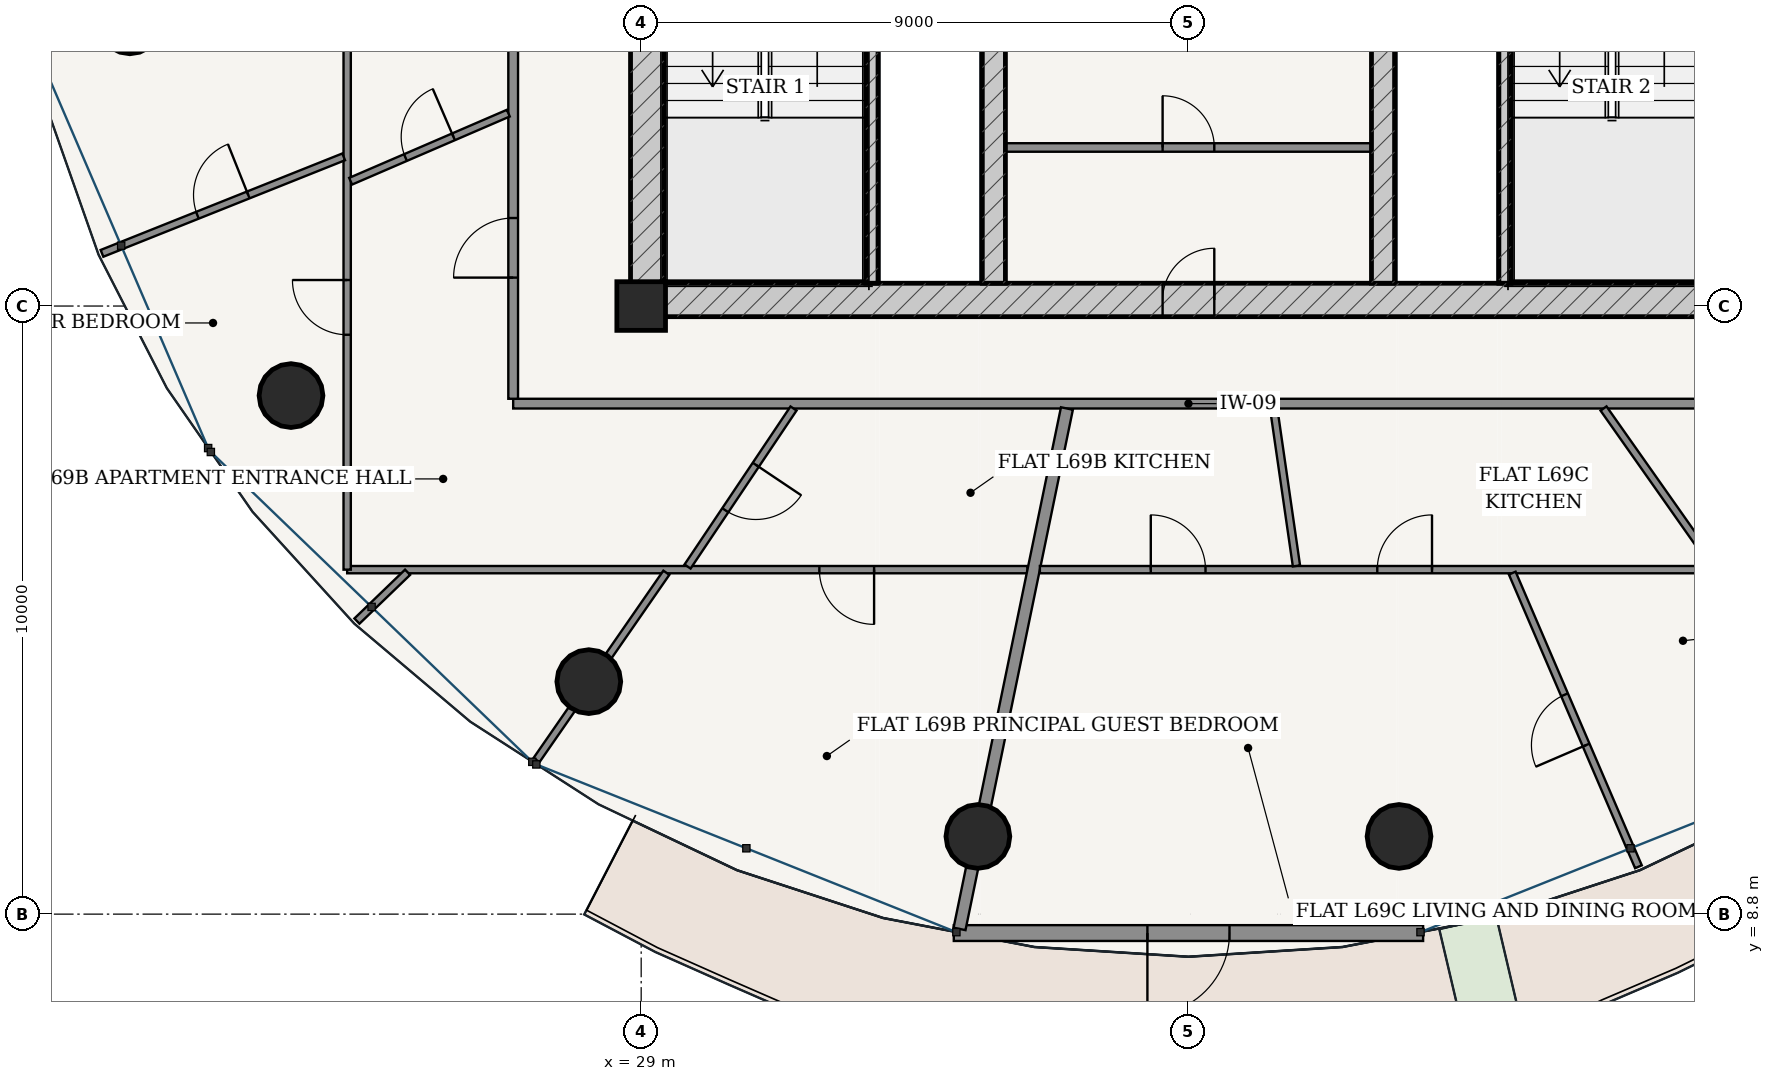
"""IFC4 building model, lengths in metres.
Left out: names, types, materials, properties, quantities, classifications, styles, units other than length and angle.
Written with IfcOpenShell. Run it as: python <this file> out.ifc"""

import sys

from ifc_helpers import new_model, si_unit, direction, frame, frame_2d, origin, origin_2d, place, context, subcontext, project, spatial, rectangle, hollow_circle, extrude, source, transform, mapped, element, fill, save


model = new_model("IFC4")
c1 = context("Model", 3, precision=1e-05, world=origin(), true_north=direction((-0.2419218956, 0.970295726276)))
c2 = subcontext(c1, "Body", "Model", "MODEL_VIEW")
j1 = project(units=[si_unit("LENGTHUNIT", "METRE"), si_unit("PLANEANGLEUNIT", "RADIAN")], contexts=[c1])
p1 = place(None, origin())
s1 = spatial("IfcSite", under=j1, at=p1, CompositionType="ELEMENT")
p2 = place(p1, origin())
s2 = spatial("IfcBuilding", under=s1, at=p2, CompositionType="ELEMENT")
p3 = place(p2, frame((0.0, 0.0, 263.2)))
s3 = spatial("IfcBuildingStorey", under=s2, at=p3, CompositionType="ELEMENT", Elevation=263.2)
p4 = place(p3, frame((29.0, 18.8, 0.0), z_axis=(0.0, 0.0, 1.0), x_axis=(1.0, 0.0, 0.0)))
e1 = element("IfcColumn", 1, at=p4, inside=s3, PredefinedType="COLUMN", context=c2, shape_type="SweptSolid", body=[
    extrude(rectangle(XDim=0.8, YDim=0.8, at=origin_2d()), origin(), (0.0, 0.0, 1.0), 3.75),
])
p5 = place(p3, frame((28.825, 18.9, 0.0), z_axis=(0.0, 0.0, 1.0), x_axis=(1.0, 0.0, 0.0)))
e2 = element("IfcWall", 2, at=p5, inside=s3, PredefinedType="SHEAR", context=c2, shape_type="SweptSolid", body=[
    extrude(rectangle(XDim=18.35, YDim=0.55, at=frame_2d((9.175, 0.0))), origin(), (0.0, 0.0, 1.0), 3.49),
])
p6 = place(p5, frame((8.75, 0.0, 0.0)))
e3 = element("IfcOpeningElement", 3, at=p6, cuts=e2, PredefinedType="OPENING", context=c2, shape_type="SweptSolid", body=[
    extrude(rectangle(XDim=0.85, YDim=2.1, at=frame_2d((0.425, 1.05))), frame((0.0, 0.285, 0.0), z_axis=(0.0, -1.0, 0.0), x_axis=(1.0, 0.0, 0.0)), (0.0, 0.0, 1.0), 0.57),
])
p7 = place(p3, frame((29.1, 19.175, 0.0), z_axis=(0.0, 0.0, 1.0), x_axis=(0.0, 1.0, 0.0)))
e4 = element("IfcWall", 4, at=p7, inside=s3, PredefinedType="SHEAR", context=c2, shape_type="SweptSolid", body=[
    extrude(rectangle(XDim=15.25, YDim=0.55, at=frame_2d((7.625, 0.0))), origin(), (0.0, 0.0, 1.0), 3.49),
])
p8 = place(p7, frame((9.875, 0.0, 0.0)))
e5 = element("IfcOpeningElement", 5, at=p8, cuts=e4, PredefinedType="OPENING", context=c2, shape_type="SweptSolid", body=[
    extrude(rectangle(XDim=1.5, YDim=2.2, at=frame_2d((0.75, 1.1))), frame((0.0, 0.285, 0.0), z_axis=(0.0, -1.0, 0.0), x_axis=(1.0, 0.0, 0.0)), (0.0, 0.0, 1.0), 0.57),
])
for number, where, z_axis, x_axis in (
    (6, (32.795, 19.175, 0.0), (0.0, 0.0, 1.0), (0.0, 1.0, 0.0)),
    (7, (43.205, 19.175, 0.0), (0.0, 0.0, 1.0), (0.0, 1.0, 0.0)),
):
    element("IfcWall", number, at=place(p3, frame(where, z_axis=z_axis, x_axis=x_axis)), inside=s3, PredefinedType="SOLIDWALL", context=c2, shape_type="SweptSolid", body=[
        extrude(rectangle(XDim=7.375, YDim=0.2, at=frame_2d((3.688, 0.0))), origin(), (0.0, 0.0, 1.0), 3.49),
    ])
p9 = place(p3, frame((34.8, 19.175, 0.0), z_axis=(0.0, 0.0, 1.0), x_axis=(0.0, 1.0, 0.0)))
e8 = element("IfcWall", 8, at=p9, inside=s3, PredefinedType="SHEAR", context=c2, shape_type="SweptSolid", body=[
    extrude(rectangle(XDim=15.25, YDim=0.38, at=frame_2d((7.625, 0.0))), origin(), (0.0, 0.0, 1.0), 3.49),
])
p10 = place(p9, frame((7.8, 0.0, 0.0)))
e9 = element("IfcOpeningElement", 9, at=p10, cuts=e8, PredefinedType="OPENING", context=c2, shape_type="SweptSolid", body=[
    extrude(rectangle(XDim=1.05, YDim=2.15, at=frame_2d((0.525, 1.075))), frame((0.0, 0.2, 0.0), z_axis=(0.0, -1.0, 0.0), x_axis=(1.0, 0.0, 0.0)), (0.0, 0.0, 1.0), 0.4),
])
p11 = place(p3, frame((41.2, 19.175, 0.0), z_axis=(0.0, 0.0, 1.0), x_axis=(0.0, 1.0, 0.0)))
e10 = element("IfcWall", 10, at=p11, inside=s3, PredefinedType="SHEAR", context=c2, shape_type="SweptSolid", body=[
    extrude(rectangle(XDim=15.25, YDim=0.38, at=frame_2d((7.625, 0.0))), origin(), (0.0, 0.0, 1.0), 3.49),
])
p12 = place(p11, frame((7.8, 0.0, 0.0)))
e11 = element("IfcOpeningElement", 11, at=p12, cuts=e10, PredefinedType="OPENING", context=c2, shape_type="SweptSolid", body=[
    extrude(rectangle(XDim=1.05, YDim=2.15, at=frame_2d((0.525, 1.075))), frame((0.0, 0.2, 0.0), z_axis=(0.0, -1.0, 0.0), x_axis=(1.0, 0.0, 0.0)), (0.0, 0.0, 1.0), 0.4),
])
for number, where, z_axis, x_axis in (
    (12, (20.591, 23.474, 0.0), (0.0, 0.0, 1.0), (1.0, 0.0, 0.0)),
    (13, (23.241, 17.328, 0.0), (0.0, 0.0, 1.0), (1.0, 0.0, 0.0)),
    (14, (28.139, 12.624, 0.0), (0.0, 0.0, 1.0), (1.0, 0.0, 0.0)),
    (15, (34.537, 10.078, 0.0), (0.0, 0.0, 1.0), (1.0, 0.0, 0.0)),
    (16, (41.463, 10.078, 0.0), (0.0, 0.0, 1.0), (1.0, 0.0, 0.0)),
):
    element("IfcColumn", number, at=place(p3, frame(where, z_axis=z_axis, x_axis=x_axis)), inside=s3, PredefinedType="COLUMN", context=c2, shape_type="SweptSolid", body=[
        extrude(hollow_circle(Radius=0.525, WallThickness=0.035, at=origin_2d()), origin(), (0.0, 0.0, 1.0), 3.75),
    ])
p13 = place(p3, frame((34.141, 8.489, 0.0), z_axis=(0.0, 0.0, 1.0), x_axis=(1.0, 0.0, 0.0)))
e17 = element("IfcWall", 17, at=p13, inside=s3, PredefinedType="SOLIDWALL", context=c2, shape_type="SweptSolid", body=[
    extrude(rectangle(XDim=7.718, YDim=0.26, at=frame_2d((3.859, 0.0))), origin(), (0.0, 0.0, 1.0), 3.49),
])
p14 = place(p13, frame((3.184, 0.0, 0.0)))
e18 = element("IfcOpeningElement", 18, at=p14, cuts=e17, PredefinedType="OPENING", context=c2, shape_type="SweptSolid", body=[
    extrude(rectangle(XDim=1.35, YDim=2.2, at=frame_2d((0.675, 1.1))), frame((0.0, 0.14, 0.0), z_axis=(0.0, -1.0, 0.0), x_axis=(1.0, 0.0, 0.0)), (0.0, 0.0, 1.0), 0.28),
])
p15 = place(p3, frame((34.99, 21.407, 0.0), z_axis=(0.0, 0.0, 1.0), x_axis=(1.0, 0.0, 0.0)))
e19 = element("IfcWall", 19, at=p15, inside=s3, PredefinedType="PARTITIONING", context=c2, shape_type="SweptSolid", body=[
    extrude(rectangle(XDim=6.02, YDim=0.14, at=frame_2d((3.01, 0.0))), origin(), (0.0, 0.0, 1.0), 3.49),
])
p16 = place(p15, frame((2.585, 0.0, 0.0)))
e20 = element("IfcOpeningElement", 20, at=p16, cuts=e19, PredefinedType="OPENING", context=c2, shape_type="SweptSolid", body=[
    extrude(rectangle(XDim=0.85, YDim=2.1, at=frame_2d((0.425, 1.05))), frame((0.0, 0.08, 0.0), z_axis=(0.0, -1.0, 0.0), x_axis=(1.0, 0.0, 0.0)), (0.0, 0.0, 1.0), 0.16),
])
p17 = place(p3, frame((26.895, 17.195, 0.0), z_axis=(0.0, 0.0, 1.0), x_axis=(1.0, 0.0, 0.0)))
e21 = element("IfcWall", 21, at=p17, inside=s3, PredefinedType="PARTITIONING", context=c2, shape_type="SweptSolid", body=[
    extrude(rectangle(XDim=22.21, YDim=0.16, at=frame_2d((11.105, 0.0))), origin(), (0.0, 0.0, 1.0), 3.015),
])
p18 = place(p3, frame((26.895, 17.275, 0.0), z_axis=(0.0, 0.0, 1.0), x_axis=(0.0, 1.0, 0.0)))
e22 = element("IfcWall", 22, at=p18, inside=s3, PredefinedType="PARTITIONING", context=c2, shape_type="SweptSolid", body=[
    extrude(rectangle(XDim=13.925, YDim=0.16, at=frame_2d((6.962, 0.0))), origin(), (0.0, 0.0, 1.0), 3.015),
])
p19 = place(p18, frame((1.992, 0.0, 0.0)))
e23 = element("IfcOpeningElement", 23, at=p19, cuts=e22, PredefinedType="OPENING", context=c2, shape_type="SweptSolid", body=[
    extrude(rectangle(XDim=0.98, YDim=2.2, at=frame_2d((0.49, 1.1))), frame((0.0, 0.09, 0.0), z_axis=(0.0, -1.0, 0.0), x_axis=(1.0, 0.0, 0.0)), (0.0, 0.0, 1.0), 0.18),
])
p20 = place(p3, frame((35.353, 14.465, 0.0), z_axis=(0.0, 0.0, 1.0), x_axis=(-1.0, 0.0, 0.0)))
e24 = element("IfcWall", 24, at=p20, inside=s3, PredefinedType="PARTITIONING", context=c2, shape_type="SweptSolid", body=[
    extrude(rectangle(XDim=11.188, YDim=0.12, at=frame_2d((5.594, 0.0))), origin(), (0.0, 0.0, 1.0), 3.015),
])
p21 = place(p20, frame((2.522, 0.0, 0.0)))
e25 = element("IfcOpeningElement", 25, at=p21, cuts=e24, PredefinedType="OPENING", context=c2, shape_type="SweptSolid", body=[
    extrude(rectangle(XDim=0.9, YDim=2.15, at=frame_2d((0.45, 1.075))), frame((0.0, 0.07, 0.0), z_axis=(0.0, -1.0, 0.0), x_axis=(1.0, 0.0, 0.0)), (0.0, 0.0, 1.0), 0.14),
])
p22 = place(p3, frame((24.165, 14.465, 0.0), z_axis=(0.0, 0.0, 1.0), x_axis=(0.0, 1.0, 0.0)))
e26 = element("IfcWall", 26, at=p22, inside=s3, PredefinedType="PARTITIONING", context=c2, shape_type="SweptSolid", body=[
    extrude(rectangle(XDim=12.233, YDim=0.12, at=frame_2d((6.116, 0.0))), origin(), (0.0, 0.0, 1.0), 3.015),
])
p23 = place(p22, frame((3.863, 0.0, 0.0)))
e27 = element("IfcOpeningElement", 27, at=p23, cuts=e26, PredefinedType="OPENING", context=c2, shape_type="SweptSolid", body=[
    extrude(rectangle(XDim=0.9, YDim=2.15, at=frame_2d((0.45, 1.075))), frame((0.0, 0.07, 0.0), z_axis=(0.0, -1.0, 0.0), x_axis=(1.0, 0.0, 0.0)), (0.0, 0.0, 1.0), 0.14),
])
p24 = place(p3, frame((24.107, 21.253, 0.0), z_axis=(0.0, 0.0, 1.0), x_axis=(-0.928712556691, -0.370800467966, 0.0)))
e28 = element("IfcWall", 28, at=p24, inside=s3, PredefinedType="PARTITIONING", context=c2, shape_type="SweptSolid", body=[
    extrude(rectangle(XDim=4.28, YDim=0.12, at=frame_2d((2.14, 0.0))), origin(), (0.0, 0.0, 1.0), 3.121),
])
p25 = place(p24, frame((1.69, 0.0, 0.0)))
e29 = element("IfcOpeningElement", 29, at=p25, cuts=e28, PredefinedType="OPENING", context=c2, shape_type="SweptSolid", body=[
    extrude(rectangle(XDim=0.9, YDim=2.15, at=frame_2d((0.45, 1.075))), frame((0.0, 0.07, 0.0), z_axis=(0.0, -1.0, 0.0), x_axis=(1.0, 0.0, 0.0)), (0.0, 0.0, 1.0), 0.14),
])
p26 = place(p3, frame((25.159, 14.422, 0.0), z_axis=(0.0, 0.0, 1.0), x_axis=(-0.720070222664, -0.693901199331, 0.0)))
e30 = element("IfcWall", 30, at=p26, inside=s3, PredefinedType="PARTITIONING", context=c2, shape_type="SweptSolid", body=[
    extrude(rectangle(XDim=1.157, YDim=0.12, at=frame_2d((0.578, 0.0))), origin(), (0.0, 0.0, 1.0), 3.49),
])
p27 = place(p3, frame((29.414, 14.414, 0.0), z_axis=(0.0, 0.0, 1.0), x_axis=(-0.569657021681, -0.821882520589, 0.0)))
e31 = element("IfcWall", 31, at=p27, inside=s3, PredefinedType="PARTITIONING", context=c2, shape_type="SweptSolid", body=[
    extrude(rectangle(XDim=3.748, YDim=0.12, at=frame_2d((1.874, 0.0))), origin(), (0.0, 0.0, 1.0), 3.015),
])
p28 = place(p3, frame((26.815, 21.972, 0.0), z_axis=(0.0, 0.0, 1.0), x_axis=(-0.918135987469, -0.396265452082, 0.0)))
e32 = element("IfcWall", 32, at=p28, inside=s3, PredefinedType="PARTITIONING", context=c2, shape_type="SweptSolid", body=[
    extrude(rectangle(XDim=2.824, YDim=0.12, at=frame_2d((1.412, 0.0))), origin(), (0.0, 0.0, 1.0), 3.209),
])
p29 = place(p28, frame((0.982, 0.0, 0.0)))
e33 = element("IfcOpeningElement", 33, at=p29, cuts=e32, PredefinedType="OPENING", context=c2, shape_type="SweptSolid", body=[
    extrude(rectangle(XDim=0.86, YDim=2.15, at=frame_2d((0.43, 1.075))), frame((0.0, 0.07, 0.0), z_axis=(0.0, -1.0, 0.0), x_axis=(1.0, 0.0, 0.0)), (0.0, 0.0, 1.0), 0.14),
])
p30 = place(p3, frame((31.505, 17.115, 0.0), z_axis=(0.0, 0.0, 1.0), x_axis=(-0.557003057019, -0.83051044212, 0.0)))
e34 = element("IfcWall", 34, at=p30, inside=s3, PredefinedType="PARTITIONING", context=c2, shape_type="SweptSolid", body=[
    extrude(rectangle(XDim=3.129, YDim=0.12, at=frame_2d((1.564, 0.0))), origin(), (0.0, 0.0, 1.0), 3.209),
])
p31 = place(p30, frame((1.114, 0.0, 0.0)))
e35 = element("IfcOpeningElement", 35, at=p31, cuts=e34, PredefinedType="OPENING", context=c2, shape_type="SweptSolid", body=[
    extrude(rectangle(XDim=0.9, YDim=2.15, at=frame_2d((0.45, 1.075))), frame((0.0, 0.07, 0.0), z_axis=(0.0, -1.0, 0.0), x_axis=(1.0, 0.0, 0.0)), (0.0, 0.0, 1.0), 0.14),
])
p32 = place(p3, frame((36.001, 17.115, 0.0), z_axis=(0.0, 0.0, 1.0), x_axis=(-0.202108543081, -0.979363128167, 0.0)))
e36 = element("IfcWall", 36, at=p32, inside=s3, PredefinedType="PARTITIONING", context=c2, shape_type="SweptSolid", body=[
    extrude(rectangle(XDim=8.739, YDim=0.2, at=frame_2d((4.369, 0.0))), origin(), (0.0, 0.0, 1.0), 3.015),
])
p33 = place(p3, frame((51.835, 14.465, 0.0), z_axis=(0.0, 0.0, 1.0), x_axis=(-1.0, 0.0, 0.0)))
e37 = element("IfcWall", 37, at=p33, inside=s3, PredefinedType="PARTITIONING", context=c2, shape_type="SweptSolid", body=[
    extrude(rectangle(XDim=16.278, YDim=0.12, at=frame_2d((8.139, 0.0))), origin(), (0.0, 0.0, 1.0), 3.015),
])
p34 = place(p33, frame((9.83, 0.0, 0.0)))
e38 = element("IfcOpeningElement", 38, at=p34, cuts=e37, PredefinedType="OPENING", context=c2, shape_type="SweptSolid", body=[
    extrude(rectangle(XDim=0.9, YDim=2.15, at=frame_2d((0.45, 1.075))), frame((0.0, 0.07, 0.0), z_axis=(0.0, -1.0, 0.0), x_axis=(1.0, 0.0, 0.0)), (0.0, 0.0, 1.0), 0.14),
])
p35 = place(p33, frame((13.554, 0.0, 0.0)))
e39 = element("IfcOpeningElement", 39, at=p35, cuts=e37, PredefinedType="OPENING", context=c2, shape_type="SweptSolid", body=[
    extrude(rectangle(XDim=0.9, YDim=2.15, at=frame_2d((0.45, 1.075))), frame((0.0, 0.07, 0.0), z_axis=(0.0, -1.0, 0.0), x_axis=(1.0, 0.0, 0.0)), (0.0, 0.0, 1.0), 0.14),
])
p36 = place(p3, frame((43.325, 14.408, 0.0), z_axis=(0.0, 0.0, 1.0), x_axis=(0.394816056217, -0.918760187292, 0.0)))
e40 = element("IfcWall", 40, at=p36, inside=s3, PredefinedType="PARTITIONING", context=c2, shape_type="SweptSolid", body=[
    extrude(rectangle(XDim=5.256, YDim=0.12, at=frame_2d((2.628, 0.0))), origin(), (0.0, 0.0, 1.0), 3.121),
])
p37 = place(p36, frame((2.178, 0.0, 0.0)))
e41 = element("IfcOpeningElement", 41, at=p37, cuts=e40, PredefinedType="OPENING", context=c2, shape_type="SweptSolid", body=[
    extrude(rectangle(XDim=0.9, YDim=2.15, at=frame_2d((0.45, 1.075))), frame((0.0, 0.07, 0.0), z_axis=(0.0, -1.0, 0.0), x_axis=(1.0, 0.0, 0.0)), (0.0, 0.0, 1.0), 0.14),
])
p38 = place(p3, frame((39.402, 17.115, 0.0), z_axis=(0.0, 0.0, 1.0), x_axis=(0.143185278857, -0.989695900728, 0.0)))
e42 = element("IfcWall", 42, at=p38, inside=s3, PredefinedType="PARTITIONING", context=c2, shape_type="SweptSolid", body=[
    extrude(rectangle(XDim=2.615, YDim=0.12, at=frame_2d((1.308, 0.0))), origin(), (0.0, 0.0, 1.0), 3.49),
])
p39 = place(p3, frame((44.826, 17.115, 0.0), z_axis=(0.0, 0.0, 1.0), x_axis=(0.57609227969, -0.817384661761, 0.0)))
e43 = element("IfcWall", 43, at=p39, inside=s3, PredefinedType="PARTITIONING", context=c2, shape_type="SweptSolid", body=[
    extrude(rectangle(XDim=3.18, YDim=0.12, at=frame_2d((1.59, 0.0))), origin(), (0.0, 0.0, 1.0), 3.209),
])
m1 = source(origin(), c2, "Body", "SweptSolid", [
    extrude(rectangle(XDim=1.35, YDim=2.2, at=frame_2d((0.675, 1.1))), frame((0.0, 0.025, 0.0), z_axis=(0.0, -1.0, 0.0), x_axis=(1.0, 0.0, 0.0)), (0.0, 0.0, 1.0), 0.05),
])
p40 = place(p14, frame((1.35, 0.0, 0.0), z_axis=(0.0, 0.0, 1.0), x_axis=(-1.0, 0.0, 0.0)))
e44 = element("IfcDoor", 44, at=p40, inside=s3, OperationType="SINGLE_SWING_RIGHT", PredefinedType="DOOR", context=c2, shape_type="MappedRepresentation", body=[
    mapped(m1, transform((0.0, 0.0, 0.0), scale=1.0)),
])
fill(e18, e44)
m2 = source(origin(), c2, "Body", "SweptSolid", [
    extrude(rectangle(XDim=0.85, YDim=2.1, at=frame_2d((0.425, 1.05))), frame((0.0, 0.025, 0.0), z_axis=(0.0, -1.0, 0.0), x_axis=(1.0, 0.0, 0.0)), (0.0, 0.0, 1.0), 0.05),
])
p41 = place(p6, origin())
e45 = element("IfcDoor", 45, at=p41, inside=s3, OperationType="SINGLE_SWING_RIGHT", PredefinedType="DOOR", context=c2, shape_type="MappedRepresentation", body=[
    mapped(m2, transform((0.0, 0.0, 0.0), scale=1.0)),
])
fill(e3, e45)
p42 = place(p16, origin())
e46 = element("IfcDoor", 46, at=p42, inside=s3, OperationType="SINGLE_SWING_LEFT", PredefinedType="DOOR", context=c2, shape_type="MappedRepresentation", body=[
    mapped(m2, transform((0.0, 0.0, 0.0), scale=1.0)),
])
fill(e20, e46)
m3 = source(origin(), c2, "Body", "SweptSolid", [
    extrude(rectangle(XDim=0.98, YDim=2.2, at=frame_2d((0.49, 1.1))), frame((0.0, 0.025, 0.0), z_axis=(0.0, -1.0, 0.0), x_axis=(1.0, 0.0, 0.0)), (0.0, 0.0, 1.0), 0.05),
])
p43 = place(p19, origin())
e47 = element("IfcDoor", 47, at=p43, inside=s3, OperationType="SINGLE_SWING_LEFT", PredefinedType="DOOR", context=c2, shape_type="MappedRepresentation", body=[
    mapped(m3, transform((0.0, 0.0, 0.0), scale=1.0)),
])
fill(e23, e47)
m4 = source(origin(), c2, "Body", "SweptSolid", [
    extrude(rectangle(XDim=0.86, YDim=2.15, at=frame_2d((0.43, 1.075))), frame((0.0, 0.025, 0.0), z_axis=(0.0, -1.0, 0.0), x_axis=(1.0, 0.0, 0.0)), (0.0, 0.0, 1.0), 0.05),
])
p44 = place(p29, frame((0.86, 0.0, 0.0), z_axis=(0.0, 0.0, 1.0), x_axis=(-1.0, 0.0, 0.0)))
e48 = element("IfcDoor", 48, at=p44, inside=s3, OperationType="SINGLE_SWING_RIGHT", PredefinedType="DOOR", context=c2, shape_type="MappedRepresentation", body=[
    mapped(m4, transform((0.0, 0.0, 0.0), scale=1.0)),
])
fill(e33, e48)
m5 = source(origin(), c2, "Body", "SweptSolid", [
    extrude(rectangle(XDim=0.9, YDim=2.15, at=frame_2d((0.45, 1.075))), frame((0.0, 0.025, 0.0), z_axis=(0.0, -1.0, 0.0), x_axis=(1.0, 0.0, 0.0)), (0.0, 0.0, 1.0), 0.05),
])
p45 = place(p31, origin())
e49 = element("IfcDoor", 49, at=p45, inside=s3, OperationType="SINGLE_SWING_LEFT", PredefinedType="DOOR", context=c2, shape_type="MappedRepresentation", body=[
    mapped(m5, transform((0.0, 0.0, 0.0), scale=1.0)),
])
fill(e35, e49)
p46 = place(p23, origin())
e50 = element("IfcDoor", 50, at=p46, inside=s3, OperationType="SINGLE_SWING_RIGHT", PredefinedType="DOOR", context=c2, shape_type="MappedRepresentation", body=[
    mapped(m5, transform((0.0, 0.0, 0.0), scale=1.0)),
])
fill(e27, e50)
p47 = place(p21, origin())
e51 = element("IfcDoor", 51, at=p47, inside=s3, OperationType="SINGLE_SWING_LEFT", PredefinedType="DOOR", context=c2, shape_type="MappedRepresentation", body=[
    mapped(m5, transform((0.0, 0.0, 0.0), scale=1.0)),
])
fill(e25, e51)
p48 = place(p25, frame((0.9, 0.0, 0.0), z_axis=(0.0, 0.0, 1.0), x_axis=(-1.0, 0.0, 0.0)))
e52 = element("IfcDoor", 52, at=p48, inside=s3, OperationType="SINGLE_SWING_RIGHT", PredefinedType="DOOR", context=c2, shape_type="MappedRepresentation", body=[
    mapped(m5, transform((0.0, 0.0, 0.0), scale=1.0)),
])
fill(e29, e52)
p49 = place(p37, frame((0.9, 0.0, 0.0), z_axis=(0.0, 0.0, 1.0), x_axis=(-1.0, 0.0, 0.0)))
e53 = element("IfcDoor", 53, at=p49, inside=s3, OperationType="SINGLE_SWING_LEFT", PredefinedType="DOOR", context=c2, shape_type="MappedRepresentation", body=[
    mapped(m5, transform((0.0, 0.0, 0.0), scale=1.0)),
])
fill(e41, e53)
p50 = place(p34, frame((0.9, 0.0, 0.0), z_axis=(0.0, 0.0, 1.0), x_axis=(-1.0, 0.0, 0.0)))
e54 = element("IfcDoor", 54, at=p50, inside=s3, OperationType="SINGLE_SWING_RIGHT", PredefinedType="DOOR", context=c2, shape_type="MappedRepresentation", body=[
    mapped(m5, transform((0.0, 0.0, 0.0), scale=1.0)),
])
fill(e38, e54)
p51 = place(p35, frame((0.9, 0.0, 0.0), z_axis=(0.0, 0.0, 1.0), x_axis=(-1.0, 0.0, 0.0)))
e55 = element("IfcDoor", 55, at=p51, inside=s3, OperationType="SINGLE_SWING_LEFT", PredefinedType="DOOR", context=c2, shape_type="MappedRepresentation", body=[
    mapped(m5, transform((0.0, 0.0, 0.0), scale=1.0)),
])
fill(e39, e55)
save(model, sys.argv[1])
